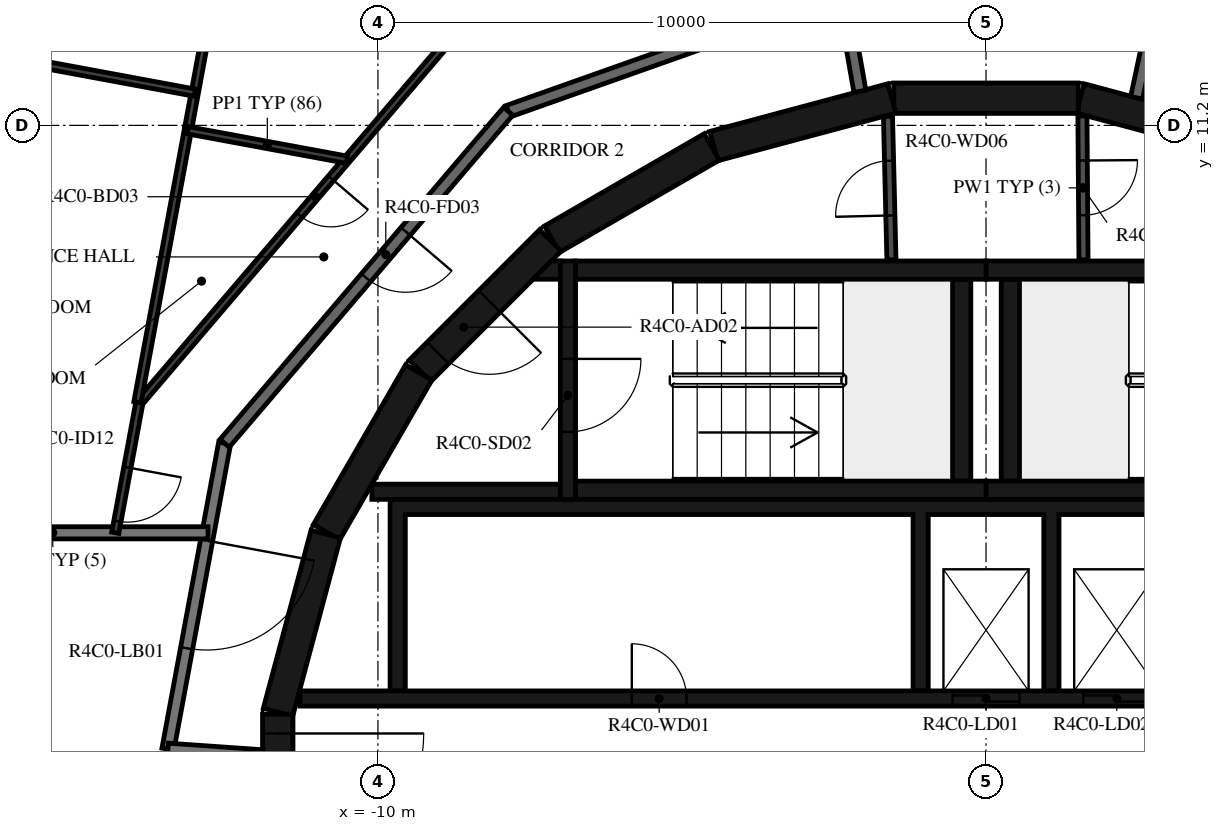
"""IFC4 building model, lengths in metres.
Left out: names, types, materials, properties, quantities, classifications, styles, units other than length and angle.
Written with IfcOpenShell. Run it as: python <this file> out.ifc"""

import sys

from ifc_helpers import new_model, si_unit, direction, frame, frame_2d, origin, place, context, subcontext, project, spatial, polyline, rectangle, outline, extrude, element, fill, save


model = new_model("IFC4")
c1 = context("Model", 3, precision=1e-05, world=origin(), true_north=direction((0.0, 1.0)))
c2 = subcontext(c1, "Body", "Model", "MODEL_VIEW")
j1 = project(units=[si_unit("LENGTHUNIT", "METRE"), si_unit("PLANEANGLEUNIT", "RADIAN")], contexts=[c1])
p1 = place(None, origin())
s1 = spatial("IfcSite", under=j1, at=p1, CompositionType="ELEMENT")
p2 = place(p1, origin())
s2 = spatial("IfcBuilding", under=s1, at=p2, CompositionType="ELEMENT")
p3 = place(p2, frame((0.0, 0.0, 179.7)))
s3 = spatial("IfcBuildingStorey", under=s2, at=p3, CompositionType="ELEMENT", Elevation=179.7)
for number, where, z_axis, x_axis in (
    (1, (4.479, 10.858, 0.0), (0.0, 0.0, 1.0), (-0.966, 0.259, 0.0)),
    (2, (1.516, 11.647, 0.0), (0.0, 0.0, 1.0), (-1.0, 0.0, 0.0)),
    (3, (-1.55, 11.643, 0.0), (0.0, 0.0, 1.0), (-0.966, -0.259, 0.0)),
    (4, (-4.51, 10.845, 0.0), (0.0, 0.0, 1.0), (-0.866, -0.5, 0.0)),
):
    element("IfcWall", number, at=place(p3, frame(where, z_axis=z_axis, x_axis=x_axis)), inside=s3, PredefinedType="SHEAR", context=c2, shape_type="SweptSolid", body=[
        extrude(rectangle(XDim=3.033, YDim=0.5, at=frame_2d((1.516, 0.0))), origin(), (0.0, 0.0, 1.0), 3.05),
    ])
p4 = place(p3, frame((-7.164, 9.308, 0.0), z_axis=(0.0, 0.0, 1.0), x_axis=(-0.707106781187, -0.707106781187, 0.0)))
e5 = element("IfcWall", 5, at=p4, inside=s3, PredefinedType="SHEAR", context=c2, shape_type="SweptSolid", body=[
    extrude(rectangle(XDim=3.032, YDim=0.5, at=frame_2d((1.516, 0.0))), origin(), (0.0, 0.0, 1.0), 3.05),
])
p5 = place(p4, frame((1.416, 0.0, 0.0)))
e6 = element("IfcOpeningElement", 6, at=p5, cuts=e5, PredefinedType="OPENING", context=c2, shape_type="SweptSolid", body=[
    extrude(rectangle(XDim=1.2, YDim=2.1, at=frame_2d((0.6, 1.05))), frame((0.0, 0.26, 0.0), z_axis=(0.0, -1.0, 0.0), x_axis=(1.0, 0.0, 0.0)), (0.0, 0.0, 1.0), 0.52),
])
for number, where, z_axis, x_axis in (
    (7, (-9.329, 7.137, 0.0), (0.0, 0.0, 1.0), (-0.5, -0.866, 0.0)),
    (8, (-10.858, 4.479, 0.0), (0.0, 0.0, 1.0), (-0.259, -0.966, 0.0)),
):
    element("IfcWall", number, at=place(p3, frame(where, z_axis=z_axis, x_axis=x_axis)), inside=s3, PredefinedType="SHEAR", context=c2, shape_type="SweptSolid", body=[
        extrude(rectangle(XDim=3.033, YDim=0.5, at=frame_2d((1.516, 0.0))), origin(), (0.0, 0.0, 1.0), 3.05),
    ])
p6 = place(p3, frame((-11.647, 1.516, 0.0), z_axis=(0.0, 0.0, 1.0), x_axis=(0.0, -1.0, 0.0)))
e9 = element("IfcWall", 9, at=p6, inside=s3, PredefinedType="SHEAR", context=c2, shape_type="SweptSolid", body=[
    extrude(rectangle(XDim=3.033, YDim=0.5, at=frame_2d((1.516, 0.0))), origin(), (0.0, 0.0, 1.0), 3.05),
])
p7 = place(p6, frame((0.316, 0.0, 0.0)))
e10 = element("IfcOpeningElement", 10, at=p7, cuts=e9, PredefinedType="OPENING", context=c2, shape_type="SweptSolid", body=[
    extrude(rectangle(XDim=2.4, YDim=2.1, at=frame_2d((1.2, 1.05))), frame((0.0, 0.26, 0.0), z_axis=(0.0, -1.0, 0.0), x_axis=(1.0, 0.0, 0.0)), (0.0, 0.0, 1.0), 0.52),
])
for number, where, z_axis, x_axis in (
    (11, (0.0, 5.2, 0.0), (0.0, 0.0, 1.0), (1.0, 0.0, 0.0)),
    (12, (0.0, 8.82, 0.0), (0.0, 0.0, 1.0), (1.0, 0.0, 0.0)),
):
    element("IfcWall", number, at=place(p3, frame(where, z_axis=z_axis, x_axis=x_axis)), inside=s3, PredefinedType="SHEAR", context=c2, shape_type="SweptSolid", body=[
        extrude(rectangle(XDim=6.75, YDim=0.3, at=frame_2d((3.375, 0.0))), origin(), (0.0, 0.0, 1.0), 3.05),
    ])
p8 = place(p3, frame((0.4, 5.35, 0.0), z_axis=(0.0, 0.0, 1.0), x_axis=(0.0, 1.0, 0.0)))
e13 = element("IfcWall", 13, at=p8, inside=s3, PredefinedType="SHEAR", context=c2, shape_type="SweptSolid", body=[
    extrude(rectangle(XDim=3.32, YDim=0.3, at=frame_2d((1.66, 0.0))), origin(), (0.0, 0.0, 1.0), 3.05),
])
for number, where, z_axis, x_axis in (
    (14, (-6.75, 5.2, 0.0), (0.0, 0.0, 1.0), (1.0, 0.0, 0.0)),
    (15, (-6.75, 8.82, 0.0), (0.0, 0.0, 1.0), (1.0, 0.0, 0.0)),
):
    element("IfcWall", number, at=place(p3, frame(where, z_axis=z_axis, x_axis=x_axis)), inside=s3, PredefinedType="SHEAR", context=c2, shape_type="SweptSolid", body=[
        extrude(rectangle(XDim=6.75, YDim=0.3, at=frame_2d((3.375, 0.0))), origin(), (0.0, 0.0, 1.0), 3.05),
    ])
p9 = place(p3, frame((-0.4, 5.35, 0.0), z_axis=(0.0, 0.0, 1.0), x_axis=(0.0, 1.0, 0.0)))
e16 = element("IfcWall", 16, at=p9, inside=s3, PredefinedType="SHEAR", context=c2, shape_type="SweptSolid", body=[
    extrude(rectangle(XDim=3.32, YDim=0.3, at=frame_2d((1.66, 0.0))), origin(), (0.0, 0.0, 1.0), 3.05),
])
p10 = place(p3, frame((-6.875, 8.97, 0.0), z_axis=(0.0, 0.0, 1.0), x_axis=(0.0, -1.0, 0.0)))
e17 = element("IfcWall", 17, at=p10, inside=s3, PredefinedType="SHEAR", context=c2, shape_type="SweptSolid", body=[
    extrude(rectangle(XDim=3.92, YDim=0.25, at=frame_2d((1.96, 0.0))), origin(), (0.0, 0.0, 1.0), 3.05),
])
p11 = place(p10, frame((1.61, 0.0, 0.0)))
e18 = element("IfcOpeningElement", 18, at=p11, cuts=e17, PredefinedType="OPENING", context=c2, shape_type="SweptSolid", body=[
    extrude(rectangle(XDim=1.2, YDim=2.1, at=frame_2d((0.6, 1.05))), frame((0.0, 0.135, 0.0), z_axis=(0.0, -1.0, 0.0), x_axis=(1.0, 0.0, 0.0)), (0.0, 0.0, 1.0), 0.27),
])
p12 = place(p3, frame((-7.0, 5.175, 0.0), z_axis=(0.0, 0.0, 1.0), x_axis=(-1.0, 0.0, 0.0)))
e19 = element("IfcWall", 19, at=p12, inside=s3, PredefinedType="SHEAR", context=c2, shape_type="SweptSolid", body=[
    extrude(rectangle(XDim=3.1, YDim=0.25, at=frame_2d((1.55, 0.0))), origin(), (0.0, 0.0, 1.0), 3.05),
])
p13 = place(p3, origin())
e20 = element("IfcWall", 20, at=p13, inside=s3, PredefinedType="SHEAR", context=c2, shape_type="SweptSolid", body=[
    extrude(outline(polyline([(-7.148, 8.97), (-7.0, 8.97), (-7.0, 8.67), (-7.448, 8.67), (-7.148, 8.97)])), origin(), (0.0, 0.0, 1.0), 3.05),
])
p14 = place(p3, origin())
e21 = element("IfcWall", 21, at=p14, inside=s3, PredefinedType="SHEAR", context=c2, shape_type="SweptSolid", body=[
    extrude(outline(polyline([(-9.55, 4.8), (-1.2, 4.8), (-1.2, 1.9), (-0.95, 1.9), (-0.95, 4.8), (0.95, 4.8), (0.95, 1.9), (1.2, 1.9), (1.2, 4.8), (3.1, 4.8), (3.1, 1.9), (3.35, 1.9), (3.35, 4.8), (5.25, 4.8), (5.25, 1.9), (5.5, 1.9), (5.5, 4.8), (7.4, 4.8), (7.4, 1.9), (7.65, 1.9), (7.65, 4.8), (9.55, 4.8), (9.55, 1.9), (9.8, 1.9), (9.8, 4.8), (9.8, 5.05), (-9.8, 5.05), (-9.8, 4.8), (-9.8, 1.9), (-9.55, 1.9), (-9.55, 4.8)])), origin(), (0.0, 0.0, 1.0), 3.05),
])
p15 = place(p3, frame((-11.28, 1.775, 0.0), z_axis=(0.0, 0.0, 1.0), x_axis=(1.0, 0.0, 0.0)))
e22 = element("IfcWall", 22, at=p15, inside=s3, PredefinedType="SHEAR", context=c2, shape_type="SweptSolid", body=[
    extrude(rectangle(XDim=14.38, YDim=0.25, at=frame_2d((7.19, 0.0))), origin(), (0.0, 0.0, 1.0), 3.05),
])
p16 = place(p15, frame((10.73, 0.0, 0.0)))
e23 = element("IfcOpeningElement", 23, at=p16, cuts=e22, PredefinedType="OPENING", context=c2, shape_type="SweptSolid", body=[
    extrude(rectangle(XDim=1.1, YDim=2.1, at=frame_2d((0.55, 1.05))), frame((0.0, 0.135, 0.0), z_axis=(0.0, -1.0, 0.0), x_axis=(1.0, 0.0, 0.0)), (0.0, 0.0, 1.0), 0.27),
])
p17 = place(p15, frame((12.88, 0.0, 0.0)))
e24 = element("IfcOpeningElement", 24, at=p17, cuts=e22, PredefinedType="OPENING", context=c2, shape_type="SweptSolid", body=[
    extrude(rectangle(XDim=1.1, YDim=2.1, at=frame_2d((0.55, 1.05))), frame((0.0, 0.135, 0.0), z_axis=(0.0, -1.0, 0.0), x_axis=(1.0, 0.0, 0.0)), (0.0, 0.0, 1.0), 0.27),
])
p18 = place(p15, frame((5.455, 0.0, 0.0)))
e25 = element("IfcOpeningElement", 25, at=p18, cuts=e22, PredefinedType="OPENING", context=c2, shape_type="SweptSolid", body=[
    extrude(rectangle(XDim=0.9, YDim=2.1, at=frame_2d((0.45, 1.05))), frame((0.0, 0.135, 0.0), z_axis=(0.0, -1.0, 0.0), x_axis=(1.0, 0.0, 0.0)), (0.0, 0.0, 1.0), 0.27),
])
p19 = place(p3, frame((1.586, 11.354, 0.0), z_axis=(0.0, 0.0, 1.0), x_axis=(0.007227482881, -0.999973881405, 0.0)))
e26 = element("IfcWall", 26, at=p19, inside=s3, PredefinedType="PARTITIONING", context=c2, shape_type="SweptSolid", body=[
    extrude(rectangle(XDim=2.365, YDim=0.15, at=frame_2d((1.182, 0.0))), origin(), (0.0, 0.0, 1.0), 3.05),
])
p20 = place(p19, frame((0.732, 0.0, 0.0)))
e27 = element("IfcOpeningElement", 27, at=p20, cuts=e26, PredefinedType="OPENING", context=c2, shape_type="SweptSolid", body=[
    extrude(rectangle(XDim=0.9, YDim=2.1, at=frame_2d((0.45, 1.05))), frame((0.0, 0.085, 0.0), z_axis=(0.0, -1.0, 0.0), x_axis=(1.0, 0.0, 0.0)), (0.0, 0.0, 1.0), 0.17),
])
p21 = place(p3, frame((-1.555, 8.99, 0.0), z_axis=(0.0, 0.0, 1.0), x_axis=(-0.024125549686, 0.999708936567, 0.0)))
e28 = element("IfcWall", 28, at=p21, inside=s3, PredefinedType="PARTITIONING", context=c2, shape_type="SweptSolid", body=[
    extrude(rectangle(XDim=2.358, YDim=0.15, at=frame_2d((1.179, 0.0))), origin(), (0.0, 0.0, 1.0), 3.05),
])
p22 = place(p21, frame((0.729, 0.0, 0.0)))
e29 = element("IfcOpeningElement", 29, at=p22, cuts=e28, PredefinedType="OPENING", context=c2, shape_type="SweptSolid", body=[
    extrude(rectangle(XDim=0.9, YDim=2.1, at=frame_2d((0.45, 1.05))), frame((0.0, 0.085, 0.0), z_axis=(0.0, -1.0, 0.0), x_axis=(1.0, 0.0, 0.0)), (0.0, 0.0, 1.0), 0.17),
])
p23 = place(p3, frame((2.787, 13.112, 0.0), z_axis=(0.0, 0.0, 1.0), x_axis=(-0.207941001029, -0.978141370197, 0.0)))
e30 = element("IfcWall", 30, at=p23, inside=s3, PredefinedType="STANDARD", context=c2, shape_type="SweptSolid", body=[
    extrude(rectangle(XDim=1.491, YDim=0.2, at=frame_2d((0.746, 0.0))), origin(), (0.0, 0.0, 1.0), 3.05),
])
p24 = place(p3, frame((-12.521, 5.972, 0.0), z_axis=(0.0, 0.0, 1.0), x_axis=(-0.182251559718, -0.983251935661, 0.0)))
e31 = element("IfcWall", 31, at=p24, inside=s3, PredefinedType="STANDARD", context=c2, shape_type="SweptSolid", body=[
    extrude(rectangle(XDim=5.117, YDim=0.2, at=frame_2d((2.559, 0.0))), origin(), (0.0, 0.0, 1.0), 3.05),
])
p25 = place(p24, frame((1.627, 0.0, 0.0)))
e32 = element("IfcOpeningElement", 32, at=p25, cuts=e31, PredefinedType="OPENING", context=c2, shape_type="SweptSolid", body=[
    extrude(rectangle(XDim=1.8, YDim=2.1, at=frame_2d((0.9, 1.05))), frame((0.0, 0.11, 0.0), z_axis=(0.0, -1.0, 0.0), x_axis=(1.0, 0.0, 0.0)), (0.0, 0.0, 1.0), 0.22),
])
p26 = place(p3, frame((-13.454, 0.941, 0.0), z_axis=(0.0, 0.0, 1.0), x_axis=(0.99755155062, -0.069934997354, 0.0)))
e33 = element("IfcWall", 33, at=p26, inside=s3, PredefinedType="STANDARD", context=c2, shape_type="SweptSolid", body=[
    extrude(rectangle(XDim=1.561, YDim=0.2, at=frame_2d((0.78, 0.0))), origin(), (0.0, 0.0, 1.0), 3.05),
])
p27 = place(p3, frame((-2.074, 11.761, 0.0), z_axis=(0.0, 0.0, 1.0), x_axis=(-0.1736412798, 0.984808969267, 0.0)))
e34 = element("IfcWall", 34, at=p27, inside=s3, PredefinedType="STANDARD", context=c2, shape_type="SweptSolid", body=[
    extrude(rectangle(XDim=1.644, YDim=0.2, at=frame_2d((0.822, 0.0))), origin(), (0.0, 0.0, 1.0), 3.05),
])
p28 = place(p3, frame((-2.359, 13.38, 0.0), z_axis=(0.0, 0.0, 1.0), x_axis=(-0.942647529236, -0.333789807551, 0.0)))
e35 = element("IfcWall", 35, at=p28, inside=s3, PredefinedType="STANDARD", context=c2, shape_type="SweptSolid", body=[
    extrude(rectangle(XDim=5.833, YDim=0.2, at=frame_2d((2.917, 0.0))), origin(), (0.0, 0.0, 1.0), 3.05),
])
p29 = place(p3, frame((-7.858, 11.433, 0.0), z_axis=(0.0, 0.0, 1.0), x_axis=(-0.649440801937, -0.760412154545, 0.0)))
e36 = element("IfcWall", 36, at=p29, inside=s3, PredefinedType="STANDARD", context=c2, shape_type="SweptSolid", body=[
    extrude(rectangle(XDim=7.181, YDim=0.2, at=frame_2d((3.59, 0.0))), origin(), (0.0, 0.0, 1.0), 3.05),
])
p30 = place(p29, frame((2.6, 0.0, 0.0)))
e37 = element("IfcOpeningElement", 37, at=p30, cuts=e36, PredefinedType="OPENING", context=c2, shape_type="SweptSolid", body=[
    extrude(rectangle(XDim=1.0, YDim=2.1, at=frame_2d((0.5, 1.05))), frame((0.0, 0.11, 0.0), z_axis=(0.0, -1.0, 0.0), x_axis=(1.0, 0.0, 0.0)), (0.0, 0.0, 1.0), 0.22),
])
p31 = place(p3, frame((-12.794, 4.5, 0.0), z_axis=(0.0, 0.0, 1.0), x_axis=(-1.0, 0.0, 0.0)))
e38 = element("IfcWall", 38, at=p31, inside=s3, PredefinedType="STANDARD", context=c2, shape_type="SweptSolid", body=[
    extrude(rectangle(XDim=5.106, YDim=0.2, at=frame_2d((2.553, 0.0))), origin(), (0.0, 0.0, 1.0), 3.05),
])
p32 = place(p3, frame((8.702, 12.206, 0.0), z_axis=(0.0, 0.0, 1.0), x_axis=(-0.760401313718, 0.649453494945, 0.0)))
e39 = element("IfcWall", 39, at=p32, inside=s3, PredefinedType="PARTITIONING", context=c2, shape_type="SweptSolid", body=[
    extrude(rectangle(XDim=16.724, YDim=0.12, at=frame_2d((8.362, 0.0))), origin(), (0.0, 0.0, 1.0), 3.05),
])
p33 = place(p32, frame((0.2, 0.0, 0.0)))
e40 = element("IfcOpeningElement", 40, at=p33, cuts=e39, PredefinedType="OPENING", context=c2, shape_type="SweptSolid", body=[
    extrude(rectangle(XDim=0.9, YDim=2.1, at=frame_2d((0.45, 1.05))), frame((0.0, 0.07, 0.0), z_axis=(0.0, -1.0, 0.0), x_axis=(1.0, 0.0, 0.0)), (0.0, 0.0, 1.0), 0.14),
])
p34 = place(p32, frame((8.02, 0.0, 0.0)))
e41 = element("IfcOpeningElement", 41, at=p34, cuts=e39, PredefinedType="OPENING", context=c2, shape_type="SweptSolid", body=[
    extrude(rectangle(XDim=0.9, YDim=2.1, at=frame_2d((0.45, 1.05))), frame((0.0, 0.07, 0.0), z_axis=(0.0, -1.0, 0.0), x_axis=(1.0, 0.0, 0.0)), (0.0, 0.0, 1.0), 0.14),
])
p35 = place(p32, frame((14.412, 0.0, 0.0)))
e42 = element("IfcOpeningElement", 42, at=p35, cuts=e39, PredefinedType="OPENING", context=c2, shape_type="SweptSolid", body=[
    extrude(rectangle(XDim=0.9, YDim=2.1, at=frame_2d((0.45, 1.05))), frame((0.0, 0.07, 0.0), z_axis=(0.0, -1.0, 0.0), x_axis=(1.0, 0.0, 0.0)), (0.0, 0.0, 1.0), 0.14),
])
p36 = place(p3, frame((-8.774, 12.669, 0.0), z_axis=(0.0, 0.0, 1.0), x_axis=(-0.649446157105, -0.760407580855, 0.0)))
e43 = element("IfcWall", 43, at=p36, inside=s3, PredefinedType="PARTITIONING", context=c2, shape_type="SweptSolid", body=[
    extrude(rectangle(XDim=7.927, YDim=0.12, at=frame_2d((3.964, 0.0))), origin(), (0.0, 0.0, 1.0), 3.05),
])
p37 = place(p36, frame((3.074, 0.0, 0.0)))
e44 = element("IfcOpeningElement", 44, at=p37, cuts=e43, PredefinedType="OPENING", context=c2, shape_type="SweptSolid", body=[
    extrude(rectangle(XDim=0.8, YDim=2.1, at=frame_2d((0.4, 1.05))), frame((0.0, 0.07, 0.0), z_axis=(0.0, -1.0, 0.0), x_axis=(1.0, 0.0, 0.0)), (0.0, 0.0, 1.0), 0.14),
])
p38 = place(p3, frame((-13.923, 6.641, 0.0), z_axis=(0.0, 0.0, 1.0), x_axis=(-0.182209715759, -0.983259690765, 0.0)))
e45 = element("IfcWall", 45, at=p38, inside=s3, PredefinedType="PARTITIONING", context=c2, shape_type="SweptSolid", body=[
    extrude(rectangle(XDim=2.177, YDim=0.12, at=frame_2d((1.089, 0.0))), origin(), (0.0, 0.0, 1.0), 3.05),
])
p39 = place(p38, frame((1.083, 0.0, 0.0)))
e46 = element("IfcOpeningElement", 46, at=p39, cuts=e45, PredefinedType="OPENING", context=c2, shape_type="SweptSolid", body=[
    extrude(rectangle(XDim=0.9, YDim=2.1, at=frame_2d((0.45, 1.05))), frame((0.0, 0.07, 0.0), z_axis=(0.0, -1.0, 0.0), x_axis=(1.0, 0.0, 0.0)), (0.0, 0.0, 1.0), 0.14),
])
p40 = place(p3, frame((-13.955, 6.647, 0.0), z_axis=(0.0, 0.0, 1.0), x_axis=(0.182264522222, 0.983249532896, 0.0)))
e47 = element("IfcWall", 47, at=p40, inside=s3, PredefinedType="PARTITIONING", context=c2, shape_type="SweptSolid", body=[
    extrude(rectangle(XDim=4.589, YDim=0.12, at=frame_2d((2.294, 0.0))), origin(), (0.0, 0.0, 1.0), 3.05),
])
p41 = place(p3, frame((-11.396, 20.453, 0.0), z_axis=(0.0, 0.0, 1.0), x_axis=(-0.182223370439, -0.983257160292, 0.0)))
e48 = element("IfcWall", 48, at=p41, inside=s3, PredefinedType="PARTITIONING", context=c2, shape_type="SweptSolid", body=[
    extrude(rectangle(XDim=9.452, YDim=0.12, at=frame_2d((4.726, 0.0))), origin(), (0.0, 0.0, 1.0), 3.05),
])
p42 = place(p41, frame((3.319, 0.0, 0.0)))
e49 = element("IfcOpeningElement", 49, at=p42, cuts=e48, PredefinedType="OPENING", context=c2, shape_type="SweptSolid", body=[
    extrude(rectangle(XDim=0.9, YDim=2.1, at=frame_2d((0.45, 1.05))), frame((0.0, 0.07, 0.0), z_axis=(0.0, -1.0, 0.0), x_axis=(1.0, 0.0, 0.0)), (0.0, 0.0, 1.0), 0.14),
])
p43 = place(p41, frame((0.2, 0.0, 0.0)))
e50 = element("IfcOpeningElement", 50, at=p43, cuts=e48, PredefinedType="OPENING", context=c2, shape_type="SweptSolid", body=[
    extrude(rectangle(XDim=0.9, YDim=2.1, at=frame_2d((0.45, 1.05))), frame((0.0, 0.07, 0.0), z_axis=(0.0, -1.0, 0.0), x_axis=(1.0, 0.0, 0.0)), (0.0, 0.0, 1.0), 0.14),
])
p44 = place(p3, frame((-13.126, 11.12, 0.0), z_axis=(0.0, 0.0, 1.0), x_axis=(0.983257646361, -0.182220747645, 0.0)))
e51 = element("IfcWall", 51, at=p44, inside=s3, PredefinedType="PARTITIONING", context=c2, shape_type="SweptSolid", body=[
    extrude(rectangle(XDim=2.659, YDim=0.12, at=frame_2d((1.33, 0.0))), origin(), (0.0, 0.0, 1.0), 3.05),
])
p45 = place(p3, frame((-16.552, 12.394, 0.0), z_axis=(0.0, 0.0, 1.0), x_axis=(0.983257712156, -0.182220392618, 0.0)))
e52 = element("IfcWall", 52, at=p45, inside=s3, PredefinedType="PARTITIONING", context=c2, shape_type="SweptSolid", body=[
    extrude(rectangle(XDim=3.6, YDim=0.12, at=frame_2d((1.8, 0.0))), origin(), (0.0, 0.0, 1.0), 3.05),
])
p46 = place(p11, origin())
e53 = element("IfcDoor", 53, at=p46, inside=s3, OperationType="SINGLE_SWING_LEFT", PredefinedType="DOOR", context=c2, shape_type="SweptSolid", body=[
    extrude(rectangle(XDim=1.2, YDim=2.1, at=frame_2d((0.6, 1.05))), frame((0.0, 0.025, 0.0), z_axis=(0.0, -1.0, 0.0), x_axis=(1.0, 0.0, 0.0)), (0.0, 0.0, 1.0), 0.05),
])
fill(e18, e53)
p47 = place(p5, origin())
e54 = element("IfcDoor", 54, at=p47, inside=s3, OperationType="SINGLE_SWING_RIGHT", PredefinedType="DOOR", context=c2, shape_type="SweptSolid", body=[
    extrude(rectangle(XDim=1.2, YDim=2.1, at=frame_2d((0.6, 1.05))), frame((0.0, 0.025, 0.0), z_axis=(0.0, -1.0, 0.0), x_axis=(1.0, 0.0, 0.0)), (0.0, 0.0, 1.0), 0.05),
])
fill(e6, e54)
p48 = place(p7, origin())
e55 = element("IfcDoor", 55, at=p48, inside=s3, OperationType="DOUBLE_DOOR_SINGLE_SWING", PredefinedType="DOOR", context=c2, shape_type="SweptSolid", body=[
    extrude(rectangle(XDim=2.4, YDim=2.1, at=frame_2d((1.2, 1.05))), frame((0.0, 0.025, 0.0), z_axis=(0.0, -1.0, 0.0), x_axis=(1.0, 0.0, 0.0)), (0.0, 0.0, 1.0), 0.05),
])
fill(e10, e55)
p49 = place(p16, origin())
e56 = element("IfcDoor", 56, at=p49, inside=s3, OperationType="DOUBLE_DOOR_SLIDING", PredefinedType="DOOR", context=c2, shape_type="SweptSolid", body=[
    extrude(rectangle(XDim=1.1, YDim=2.1, at=frame_2d((0.55, 1.05))), frame((0.0, 0.025, 0.0), z_axis=(0.0, -1.0, 0.0), x_axis=(1.0, 0.0, 0.0)), (0.0, 0.0, 1.0), 0.05),
])
fill(e23, e56)
p50 = place(p17, origin())
e57 = element("IfcDoor", 57, at=p50, inside=s3, OperationType="DOUBLE_DOOR_SLIDING", PredefinedType="DOOR", context=c2, shape_type="SweptSolid", body=[
    extrude(rectangle(XDim=1.1, YDim=2.1, at=frame_2d((0.55, 1.05))), frame((0.0, 0.025, 0.0), z_axis=(0.0, -1.0, 0.0), x_axis=(1.0, 0.0, 0.0)), (0.0, 0.0, 1.0), 0.05),
])
fill(e24, e57)
p51 = place(p18, origin())
e58 = element("IfcDoor", 58, at=p51, inside=s3, OperationType="SINGLE_SWING_LEFT", PredefinedType="DOOR", context=c2, shape_type="SweptSolid", body=[
    extrude(rectangle(XDim=0.9, YDim=2.1, at=frame_2d((0.45, 1.05))), frame((0.0, 0.025, 0.0), z_axis=(0.0, -1.0, 0.0), x_axis=(1.0, 0.0, 0.0)), (0.0, 0.0, 1.0), 0.05),
])
fill(e25, e58)
p52 = place(p20, origin())
e59 = element("IfcDoor", 59, at=p52, inside=s3, OperationType="SINGLE_SWING_LEFT", PredefinedType="DOOR", context=c2, shape_type="SweptSolid", body=[
    extrude(rectangle(XDim=0.9, YDim=2.1, at=frame_2d((0.45, 1.05))), frame((0.0, 0.025, 0.0), z_axis=(0.0, -1.0, 0.0), x_axis=(1.0, 0.0, 0.0)), (0.0, 0.0, 1.0), 0.05),
])
fill(e27, e59)
p53 = place(p22, origin())
e60 = element("IfcDoor", 60, at=p53, inside=s3, OperationType="SINGLE_SWING_RIGHT", PredefinedType="DOOR", context=c2, shape_type="SweptSolid", body=[
    extrude(rectangle(XDim=0.9, YDim=2.1, at=frame_2d((0.45, 1.05))), frame((0.0, 0.025, 0.0), z_axis=(0.0, -1.0, 0.0), x_axis=(1.0, 0.0, 0.0)), (0.0, 0.0, 1.0), 0.05),
])
fill(e29, e60)
p54 = place(p30, origin())
e61 = element("IfcDoor", 61, at=p54, inside=s3, OperationType="SINGLE_SWING_LEFT", PredefinedType="DOOR", context=c2, shape_type="SweptSolid", body=[
    extrude(rectangle(XDim=1.0, YDim=2.1, at=frame_2d((0.5, 1.05))), frame((0.0, 0.025, 0.0), z_axis=(0.0, -1.0, 0.0), x_axis=(1.0, 0.0, 0.0)), (0.0, 0.0, 1.0), 0.05),
])
fill(e37, e61)
p55 = place(p37, origin())
e62 = element("IfcDoor", 62, at=p55, inside=s3, OperationType="SINGLE_SWING_LEFT", PredefinedType="DOOR", context=c2, shape_type="SweptSolid", body=[
    extrude(rectangle(XDim=0.8, YDim=2.1, at=frame_2d((0.4, 1.05))), frame((0.0, 0.025, 0.0), z_axis=(0.0, -1.0, 0.0), x_axis=(1.0, 0.0, 0.0)), (0.0, 0.0, 1.0), 0.05),
])
fill(e44, e62)
p56 = place(p39, origin())
e63 = element("IfcDoor", 63, at=p56, inside=s3, OperationType="SINGLE_SWING_LEFT", PredefinedType="DOOR", context=c2, shape_type="SweptSolid", body=[
    extrude(rectangle(XDim=0.9, YDim=2.1, at=frame_2d((0.45, 1.05))), frame((0.0, 0.025, 0.0), z_axis=(0.0, -1.0, 0.0), x_axis=(1.0, 0.0, 0.0)), (0.0, 0.0, 1.0), 0.05),
])
fill(e46, e63)
p57 = place(p25, origin())
e64 = element("IfcDoor", 64, at=p57, inside=s3, OperationType="DOUBLE_DOOR_SINGLE_SWING", PredefinedType="DOOR", context=c2, shape_type="SweptSolid", body=[
    extrude(rectangle(XDim=1.8, YDim=2.1, at=frame_2d((0.9, 1.05))), frame((0.0, 0.025, 0.0), z_axis=(0.0, -1.0, 0.0), x_axis=(1.0, 0.0, 0.0)), (0.0, 0.0, 1.0), 0.05),
])
fill(e32, e64)
save(model, sys.argv[1])
